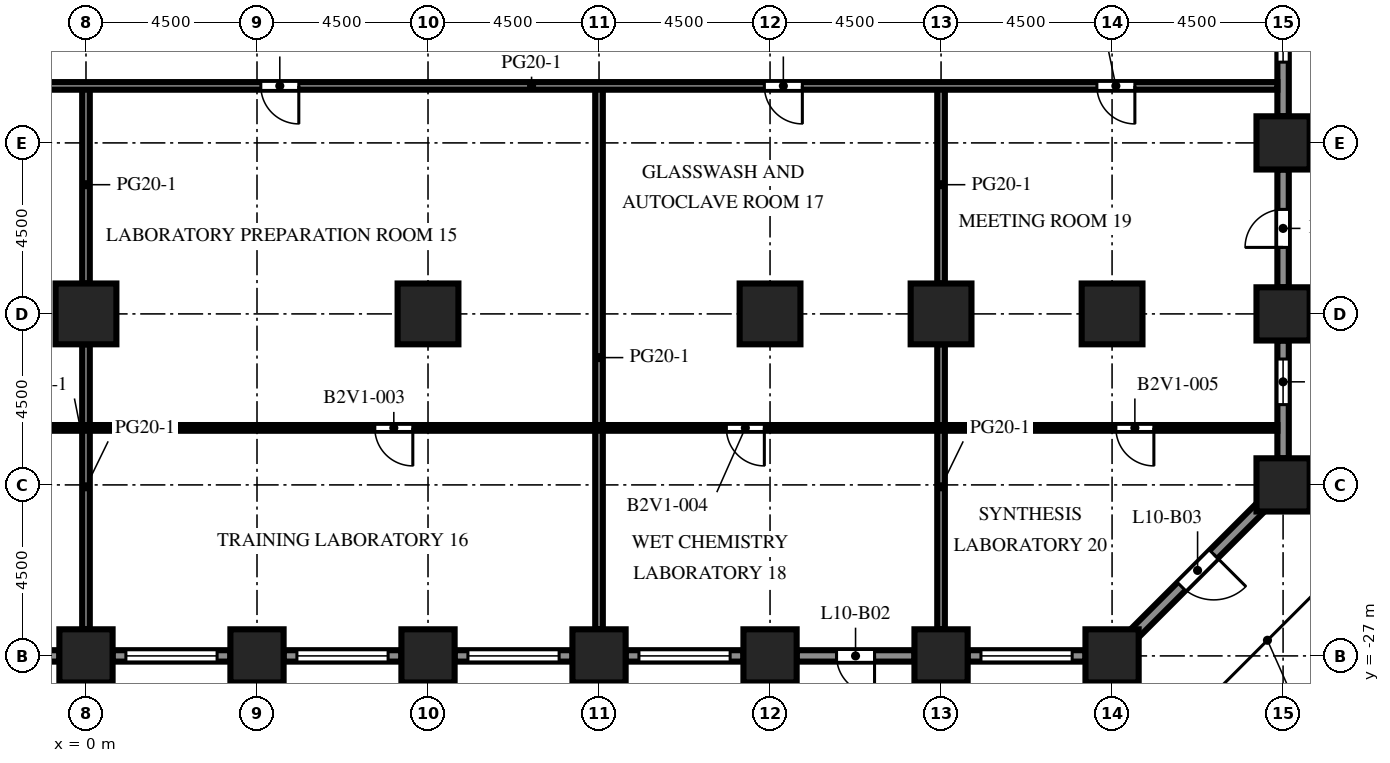
"""IFC4 building model, lengths in metres.
Left out: names, types, materials, properties, quantities, classifications, styles, units other than length and angle.
Written with IfcOpenShell. Run it as: python <this file> out.ifc"""

import sys

from ifc_helpers import new_model, si_unit, direction, frame, frame_2d, origin, origin_2d, place, context, subcontext, project, spatial, rectangle, extrude, element, fill, save


model = new_model("IFC4")
c1 = context("Model", 3, precision=1e-05, world=origin(), true_north=direction((0.0, 1.0)))
c2 = subcontext(c1, "Body", "Model", "MODEL_VIEW")
j1 = project(units=[si_unit("LENGTHUNIT", "METRE"), si_unit("PLANEANGLEUNIT", "RADIAN")], contexts=[c1])
p1 = place(None, origin())
s1 = spatial("IfcSite", under=j1, at=p1, CompositionType="ELEMENT")
p2 = place(p1, origin())
s2 = spatial("IfcBuilding", under=s1, at=p2, CompositionType="ELEMENT")
p3 = place(p2, frame((0.0, 0.0, 46.0)))
s3 = spatial("IfcBuildingStorey", under=s2, at=p3, CompositionType="ELEMENT", Elevation=46.0)
for number, where, z_axis, x_axis in (
    (1, (0.0, -27.0, 0.0), (0.0, 0.0, 1.0), (1.0, 0.0, 0.0)),
    (2, (4.5, -27.0, 0.0), (0.0, 0.0, 1.0), (1.0, 0.0, 0.0)),
    (3, (9.0, -27.0, 0.0), (0.0, 0.0, 1.0), (1.0, 0.0, 0.0)),
    (4, (13.5, -27.0, 0.0), (0.0, 0.0, 1.0), (1.0, 0.0, 0.0)),
    (5, (18.0, -27.0, 0.0), (0.0, 0.0, 1.0), (1.0, 0.0, 0.0)),
    (6, (22.5, -27.0, 0.0), (0.0, 0.0, 1.0), (1.0, 0.0, 0.0)),
    (7, (27.0, -27.0, 0.0), (0.0, 0.0, 1.0), (1.0, 0.0, 0.0)),
    (8, (31.5, -22.5, 0.0), (0.0, 0.0, 1.0), (1.0, 0.0, 0.0)),
    (9, (31.5, -18.0, 0.0), (0.0, 0.0, 1.0), (1.0, 0.0, 0.0)),
    (10, (31.5, -13.5, 0.0), (0.0, 0.0, 1.0), (1.0, 0.0, 0.0)),
):
    element("IfcColumn", number, at=place(p3, frame(where, z_axis=z_axis, x_axis=x_axis)), inside=s3, PredefinedType="COLUMN", context=c2, shape_type="SweptSolid", body=[
        extrude(rectangle(XDim=1.4, YDim=1.4, at=origin_2d()), origin(), (0.0, 0.0, 1.0), 4.1),
    ])
for number, where, z_axis, x_axis in (
    (11, (0.0, -18.0, 0.0), (0.0, 0.0, 1.0), (1.0, 0.0, 0.0)),
    (12, (9.0, -18.0, 0.0), (0.0, 0.0, 1.0), (1.0, 0.0, 0.0)),
    (13, (18.0, -18.0, 0.0), (0.0, 0.0, 1.0), (1.0, 0.0, 0.0)),
    (14, (22.5, -18.0, 0.0), (0.0, 0.0, 1.0), (1.0, 0.0, 0.0)),
    (15, (27.0, -18.0, 0.0), (0.0, 0.0, 1.0), (1.0, 0.0, 0.0)),
):
    element("IfcColumn", number, at=place(p3, frame(where, z_axis=z_axis, x_axis=x_axis)), inside=s3, PredefinedType="COLUMN", context=c2, shape_type="SweptSolid", body=[
        extrude(rectangle(XDim=1.6, YDim=1.6, at=origin_2d()), origin(), (0.0, 0.0, 1.0), 4.1),
    ])
p4 = place(p3, frame((-0.7, -27.0, 0.0), z_axis=(0.0, 0.0, 1.0), x_axis=(-1.0, 0.0, 0.0)))
e16 = element("IfcWall", 16, at=p4, inside=s3, PredefinedType="SOLIDWALL", context=c2, shape_type="SweptSolid", body=[
    extrude(rectangle(XDim=3.1, YDim=0.3, at=frame_2d((1.55, 0.0))), origin(), (0.0, 0.0, 1.0), 2.75),
])
p5 = place(p4, frame((0.35, 0.0, 0.8)))
e17 = element("IfcOpeningElement", 17, at=p5, cuts=e16, PredefinedType="OPENING", context=c2, shape_type="SweptSolid", body=[
    extrude(rectangle(XDim=2.4, YDim=1.7, at=frame_2d((1.2, 0.85))), frame((0.0, 0.16, 0.0), z_axis=(0.0, -1.0, 0.0), x_axis=(1.0, 0.0, 0.0)), (0.0, 0.0, 1.0), 0.32),
])
p6 = place(p3, frame((3.8, -27.0, 0.0), z_axis=(0.0, 0.0, 1.0), x_axis=(-1.0, 0.0, 0.0)))
e18 = element("IfcWall", 18, at=p6, inside=s3, PredefinedType="SOLIDWALL", context=c2, shape_type="SweptSolid", body=[
    extrude(rectangle(XDim=3.1, YDim=0.3, at=frame_2d((1.55, 0.0))), origin(), (0.0, 0.0, 1.0), 2.75),
])
p7 = place(p6, frame((0.35, 0.0, 0.8)))
e19 = element("IfcOpeningElement", 19, at=p7, cuts=e18, PredefinedType="OPENING", context=c2, shape_type="SweptSolid", body=[
    extrude(rectangle(XDim=2.4, YDim=1.7, at=frame_2d((1.2, 0.85))), frame((0.0, 0.16, 0.0), z_axis=(0.0, -1.0, 0.0), x_axis=(1.0, 0.0, 0.0)), (0.0, 0.0, 1.0), 0.32),
])
p8 = place(p3, frame((8.3, -27.0, 0.0), z_axis=(0.0, 0.0, 1.0), x_axis=(-1.0, 0.0, 0.0)))
e20 = element("IfcWall", 20, at=p8, inside=s3, PredefinedType="SOLIDWALL", context=c2, shape_type="SweptSolid", body=[
    extrude(rectangle(XDim=3.1, YDim=0.3, at=frame_2d((1.55, 0.0))), origin(), (0.0, 0.0, 1.0), 2.75),
])
p9 = place(p8, frame((0.35, 0.0, 0.8)))
e21 = element("IfcOpeningElement", 21, at=p9, cuts=e20, PredefinedType="OPENING", context=c2, shape_type="SweptSolid", body=[
    extrude(rectangle(XDim=2.4, YDim=1.7, at=frame_2d((1.2, 0.85))), frame((0.0, 0.16, 0.0), z_axis=(0.0, -1.0, 0.0), x_axis=(1.0, 0.0, 0.0)), (0.0, 0.0, 1.0), 0.32),
])
p10 = place(p3, frame((12.8, -27.0, 0.0), z_axis=(0.0, 0.0, 1.0), x_axis=(-1.0, 0.0, 0.0)))
e22 = element("IfcWall", 22, at=p10, inside=s3, PredefinedType="SOLIDWALL", context=c2, shape_type="SweptSolid", body=[
    extrude(rectangle(XDim=3.1, YDim=0.3, at=frame_2d((1.55, 0.0))), origin(), (0.0, 0.0, 1.0), 2.75),
])
p11 = place(p10, frame((0.35, 0.0, 0.8)))
e23 = element("IfcOpeningElement", 23, at=p11, cuts=e22, PredefinedType="OPENING", context=c2, shape_type="SweptSolid", body=[
    extrude(rectangle(XDim=2.4, YDim=1.7, at=frame_2d((1.2, 0.85))), frame((0.0, 0.16, 0.0), z_axis=(0.0, -1.0, 0.0), x_axis=(1.0, 0.0, 0.0)), (0.0, 0.0, 1.0), 0.32),
])
p12 = place(p3, frame((17.3, -27.0, 0.0), z_axis=(0.0, 0.0, 1.0), x_axis=(-1.0, 0.0, 0.0)))
e24 = element("IfcWall", 24, at=p12, inside=s3, PredefinedType="SOLIDWALL", context=c2, shape_type="SweptSolid", body=[
    extrude(rectangle(XDim=3.1, YDim=0.3, at=frame_2d((1.55, 0.0))), origin(), (0.0, 0.0, 1.0), 2.75),
])
p13 = place(p12, frame((0.35, 0.0, 0.8)))
e25 = element("IfcOpeningElement", 25, at=p13, cuts=e24, PredefinedType="OPENING", context=c2, shape_type="SweptSolid", body=[
    extrude(rectangle(XDim=2.4, YDim=1.7, at=frame_2d((1.2, 0.85))), frame((0.0, 0.16, 0.0), z_axis=(0.0, -1.0, 0.0), x_axis=(1.0, 0.0, 0.0)), (0.0, 0.0, 1.0), 0.32),
])
p14 = place(p3, frame((21.8, -27.0, 0.0), z_axis=(0.0, 0.0, 1.0), x_axis=(-1.0, 0.0, 0.0)))
e26 = element("IfcWall", 26, at=p14, inside=s3, PredefinedType="SOLIDWALL", context=c2, shape_type="SweptSolid", body=[
    extrude(rectangle(XDim=3.1, YDim=0.3, at=frame_2d((1.55, 0.0))), origin(), (0.0, 0.0, 1.0), 2.75),
])
p15 = place(p14, frame((1.05, 0.0, 0.0)))
e27 = element("IfcOpeningElement", 27, at=p15, cuts=e26, PredefinedType="OPENING", context=c2, shape_type="SweptSolid", body=[
    extrude(rectangle(XDim=1.0, YDim=2.2, at=frame_2d((0.5, 1.1))), frame((0.0, 0.16, 0.0), z_axis=(0.0, -1.0, 0.0), x_axis=(1.0, 0.0, 0.0)), (0.0, 0.0, 1.0), 0.32),
])
p16 = place(p3, frame((26.3, -27.0, 0.0), z_axis=(0.0, 0.0, 1.0), x_axis=(-1.0, 0.0, 0.0)))
e28 = element("IfcWall", 28, at=p16, inside=s3, PredefinedType="SOLIDWALL", context=c2, shape_type="SweptSolid", body=[
    extrude(rectangle(XDim=3.1, YDim=0.3, at=frame_2d((1.55, 0.0))), origin(), (0.0, 0.0, 1.0), 2.75),
])
p17 = place(p16, frame((0.35, 0.0, 0.8)))
e29 = element("IfcOpeningElement", 29, at=p17, cuts=e28, PredefinedType="OPENING", context=c2, shape_type="SweptSolid", body=[
    extrude(rectangle(XDim=2.4, YDim=1.7, at=frame_2d((1.2, 0.85))), frame((0.0, 0.16, 0.0), z_axis=(0.0, -1.0, 0.0), x_axis=(1.0, 0.0, 0.0)), (0.0, 0.0, 1.0), 0.32),
])
p18 = place(p3, frame((30.906, -23.094, 0.0), z_axis=(0.0, 0.0, 1.0), x_axis=(-0.707106781187, -0.707106781187, 0.0)))
e30 = element("IfcWall", 30, at=p18, inside=s3, PredefinedType="SOLIDWALL", context=c2, shape_type="SweptSolid", body=[
    extrude(rectangle(XDim=4.684, YDim=0.3, at=frame_2d((2.342, 0.0))), origin(), (0.0, 0.0, 1.0), 2.75),
])
p19 = place(p18, frame((1.742, 0.0, 0.0)))
e31 = element("IfcOpeningElement", 31, at=p19, cuts=e30, PredefinedType="OPENING", context=c2, shape_type="SweptSolid", body=[
    extrude(rectangle(XDim=1.2, YDim=2.2, at=frame_2d((0.6, 1.1))), frame((0.0, 0.16, 0.0), z_axis=(0.0, -1.0, 0.0), x_axis=(1.0, 0.0, 0.0)), (0.0, 0.0, 1.0), 0.32),
])
p20 = place(p3, frame((31.5, -18.7, 0.0), z_axis=(0.0, 0.0, 1.0), x_axis=(0.0, -1.0, 0.0)))
e32 = element("IfcWall", 32, at=p20, inside=s3, PredefinedType="SOLIDWALL", context=c2, shape_type="SweptSolid", body=[
    extrude(rectangle(XDim=3.1, YDim=0.3, at=frame_2d((1.55, 0.0))), origin(), (0.0, 0.0, 1.0), 2.75),
])
p21 = place(p20, frame((0.488, 0.0, 0.8)))
e33 = element("IfcOpeningElement", 33, at=p21, cuts=e32, PredefinedType="OPENING", context=c2, shape_type="SweptSolid", body=[
    extrude(rectangle(XDim=1.2, YDim=1.7, at=frame_2d((0.6, 0.85))), frame((0.0, 0.16, 0.0), z_axis=(0.0, -1.0, 0.0), x_axis=(1.0, 0.0, 0.0)), (0.0, 0.0, 1.0), 0.32),
])
p22 = place(p3, frame((31.5, -14.2, 0.0), z_axis=(0.0, 0.0, 1.0), x_axis=(0.0, -1.0, 0.0)))
e34 = element("IfcWall", 34, at=p22, inside=s3, PredefinedType="SOLIDWALL", context=c2, shape_type="SweptSolid", body=[
    extrude(rectangle(XDim=3.1, YDim=0.3, at=frame_2d((1.55, 0.0))), origin(), (0.0, 0.0, 1.0), 2.75),
])
p23 = place(p22, frame((1.05, 0.0, 0.0)))
e35 = element("IfcOpeningElement", 35, at=p23, cuts=e34, PredefinedType="OPENING", context=c2, shape_type="SweptSolid", body=[
    extrude(rectangle(XDim=1.0, YDim=2.2, at=frame_2d((0.5, 1.1))), frame((0.0, 0.16, 0.0), z_axis=(0.0, -1.0, 0.0), x_axis=(1.0, 0.0, 0.0)), (0.0, 0.0, 1.0), 0.32),
])
p24 = place(p3, frame((31.5, -9.7, 0.0), z_axis=(0.0, 0.0, 1.0), x_axis=(0.0, -1.0, 0.0)))
e36 = element("IfcWall", 36, at=p24, inside=s3, PredefinedType="SOLIDWALL", context=c2, shape_type="SweptSolid", body=[
    extrude(rectangle(XDim=3.1, YDim=0.3, at=frame_2d((1.55, 0.0))), origin(), (0.0, 0.0, 1.0), 2.75),
])
p25 = place(p24, frame((0.475, 0.0, 0.8)))
e37 = element("IfcOpeningElement", 37, at=p25, cuts=e36, PredefinedType="OPENING", context=c2, shape_type="SweptSolid", body=[
    extrude(rectangle(XDim=1.2, YDim=1.7, at=frame_2d((0.6, 0.85))), frame((0.0, 0.16, 0.0), z_axis=(0.0, -1.0, 0.0), x_axis=(1.0, 0.0, 0.0)), (0.0, 0.0, 1.0), 0.32),
])
p26 = place(p3, frame((0.0, -26.3, 0.0), z_axis=(0.0, 0.0, 1.0), x_axis=(0.0, 1.0, 0.0)))
e38 = element("IfcWall", 38, at=p26, inside=s3, PredefinedType="PARTITIONING", context=c2, shape_type="SweptSolid", body=[
    extrude(rectangle(XDim=7.5, YDim=0.2, at=frame_2d((3.75, 0.0))), origin(), (0.0, 0.0, 1.0), 3.65),
])
p27 = place(p3, frame((0.0, -17.2, 0.0), z_axis=(0.0, 0.0, 1.0), x_axis=(0.0, 1.0, 0.0)))
e39 = element("IfcWall", 39, at=p27, inside=s3, PredefinedType="PARTITIONING", context=c2, shape_type="SweptSolid", body=[
    extrude(rectangle(XDim=5.2, YDim=0.2, at=frame_2d((2.6, 0.0))), origin(), (0.0, 0.0, 1.0), 3.65),
])
p28 = place(p3, frame((13.5, -26.3, 0.0), z_axis=(0.0, 0.0, 1.0), x_axis=(0.0, 1.0, 0.0)))
e40 = element("IfcWall", 40, at=p28, inside=s3, PredefinedType="PARTITIONING", context=c2, shape_type="SweptSolid", body=[
    extrude(rectangle(XDim=14.3, YDim=0.2, at=frame_2d((7.15, 0.0))), origin(), (0.0, 0.0, 1.0), 3.65),
])
p29 = place(p3, frame((22.5, -26.3, 0.0), z_axis=(0.0, 0.0, 1.0), x_axis=(0.0, 1.0, 0.0)))
e41 = element("IfcWall", 41, at=p29, inside=s3, PredefinedType="PARTITIONING", context=c2, shape_type="SweptSolid", body=[
    extrude(rectangle(XDim=7.5, YDim=0.2, at=frame_2d((3.75, 0.0))), origin(), (0.0, 0.0, 1.0), 3.65),
])
p30 = place(p3, frame((22.5, -17.2, 0.0), z_axis=(0.0, 0.0, 1.0), x_axis=(0.0, 1.0, 0.0)))
e42 = element("IfcWall", 42, at=p30, inside=s3, PredefinedType="PARTITIONING", context=c2, shape_type="SweptSolid", body=[
    extrude(rectangle(XDim=5.2, YDim=0.2, at=frame_2d((2.6, 0.0))), origin(), (0.0, 0.0, 1.0), 3.65),
])
p31 = place(p3, frame((31.35, -21.0, 0.0), z_axis=(0.0, 0.0, 1.0), x_axis=(-1.0, 0.0, 0.0)))
e43 = element("IfcWall", 43, at=p31, inside=s3, PredefinedType="PARTITIONING", context=c2, shape_type="SweptSolid", body=[
    extrude(rectangle(XDim=53.7, YDim=0.15, at=frame_2d((26.85, 0.0))), origin(), (0.0, 0.0, 1.0), 3.65),
])
p32 = place(p31, frame((48.5, 0.0, 0.0)))
e44 = element("IfcOpeningElement", 44, at=p32, cuts=e43, PredefinedType="OPENING", context=c2, shape_type="SweptSolid", body=[
    extrude(rectangle(XDim=1.0, YDim=2.1, at=frame_2d((0.5, 1.05))), frame((0.0, 0.085, 0.0), z_axis=(0.0, -1.0, 0.0), x_axis=(1.0, 0.0, 0.0)), (0.0, 0.0, 1.0), 0.17),
])
p33 = place(p31, frame((39.25, 0.0, 0.0)))
e45 = element("IfcOpeningElement", 45, at=p33, cuts=e43, PredefinedType="OPENING", context=c2, shape_type="SweptSolid", body=[
    extrude(rectangle(XDim=1.0, YDim=2.1, at=frame_2d((0.5, 1.05))), frame((0.0, 0.085, 0.0), z_axis=(0.0, -1.0, 0.0), x_axis=(1.0, 0.0, 0.0)), (0.0, 0.0, 1.0), 0.17),
])
p34 = place(p31, frame((22.75, 0.0, 0.0)))
e46 = element("IfcOpeningElement", 46, at=p34, cuts=e43, PredefinedType="OPENING", context=c2, shape_type="SweptSolid", body=[
    extrude(rectangle(XDim=1.0, YDim=2.1, at=frame_2d((0.5, 1.05))), frame((0.0, 0.085, 0.0), z_axis=(0.0, -1.0, 0.0), x_axis=(1.0, 0.0, 0.0)), (0.0, 0.0, 1.0), 0.17),
])
p35 = place(p31, frame((13.5, 0.0, 0.0)))
e47 = element("IfcOpeningElement", 47, at=p35, cuts=e43, PredefinedType="OPENING", context=c2, shape_type="SweptSolid", body=[
    extrude(rectangle(XDim=1.0, YDim=2.1, at=frame_2d((0.5, 1.05))), frame((0.0, 0.085, 0.0), z_axis=(0.0, -1.0, 0.0), x_axis=(1.0, 0.0, 0.0)), (0.0, 0.0, 1.0), 0.17),
])
p36 = place(p31, frame((3.25, 0.0, 0.0)))
e48 = element("IfcOpeningElement", 48, at=p36, cuts=e43, PredefinedType="OPENING", context=c2, shape_type="SweptSolid", body=[
    extrude(rectangle(XDim=1.0, YDim=2.1, at=frame_2d((0.5, 1.05))), frame((0.0, 0.085, 0.0), z_axis=(0.0, -1.0, 0.0), x_axis=(1.0, 0.0, 0.0)), (0.0, 0.0, 1.0), 0.17),
])
p37 = place(p3, frame((31.35, -12.0, 0.0), z_axis=(0.0, 0.0, 1.0), x_axis=(-1.0, 0.0, 0.0)))
e49 = element("IfcWall", 49, at=p37, inside=s3, PredefinedType="PARTITIONING", context=c2, shape_type="SweptSolid", body=[
    extrude(rectangle(XDim=53.7, YDim=0.2, at=frame_2d((26.85, 0.0))), origin(), (0.0, 0.0, 1.0), 3.65),
])
p38 = place(p37, frame((48.25, 0.0, 0.0)))
e50 = element("IfcOpeningElement", 50, at=p38, cuts=e49, PredefinedType="OPENING", context=c2, shape_type="SweptSolid", body=[
    extrude(rectangle(XDim=1.0, YDim=2.1, at=frame_2d((0.5, 1.05))), frame((0.0, 0.11, 0.0), z_axis=(0.0, -1.0, 0.0), x_axis=(1.0, 0.0, 0.0)), (0.0, 0.0, 1.0), 0.22),
])
p39 = place(p37, frame((36.0, 0.0, 0.0)))
e51 = element("IfcOpeningElement", 51, at=p39, cuts=e49, PredefinedType="OPENING", context=c2, shape_type="SweptSolid", body=[
    extrude(rectangle(XDim=1.0, YDim=2.1, at=frame_2d((0.5, 1.05))), frame((0.0, 0.11, 0.0), z_axis=(0.0, -1.0, 0.0), x_axis=(1.0, 0.0, 0.0)), (0.0, 0.0, 1.0), 0.22),
])
p40 = place(p37, frame((25.75, 0.0, 0.0)))
e52 = element("IfcOpeningElement", 52, at=p40, cuts=e49, PredefinedType="OPENING", context=c2, shape_type="SweptSolid", body=[
    extrude(rectangle(XDim=1.0, YDim=2.1, at=frame_2d((0.5, 1.05))), frame((0.0, 0.11, 0.0), z_axis=(0.0, -1.0, 0.0), x_axis=(1.0, 0.0, 0.0)), (0.0, 0.0, 1.0), 0.22),
])
p41 = place(p37, frame((12.5, 0.0, 0.0)))
e53 = element("IfcOpeningElement", 53, at=p41, cuts=e49, PredefinedType="OPENING", context=c2, shape_type="SweptSolid", body=[
    extrude(rectangle(XDim=1.0, YDim=2.1, at=frame_2d((0.5, 1.05))), frame((0.0, 0.11, 0.0), z_axis=(0.0, -1.0, 0.0), x_axis=(1.0, 0.0, 0.0)), (0.0, 0.0, 1.0), 0.22),
])
p42 = place(p37, frame((3.75, 0.0, 0.0)))
e54 = element("IfcOpeningElement", 54, at=p42, cuts=e49, PredefinedType="OPENING", context=c2, shape_type="SweptSolid", body=[
    extrude(rectangle(XDim=1.0, YDim=2.1, at=frame_2d((0.5, 1.05))), frame((0.0, 0.11, 0.0), z_axis=(0.0, -1.0, 0.0), x_axis=(1.0, 0.0, 0.0)), (0.0, 0.0, 1.0), 0.22),
])
p43 = place(p7, origin())
e55 = element("IfcWindow", 55, at=p43, inside=s3, PartitioningType="SINGLE_PANEL", PredefinedType="WINDOW", context=c2, shape_type="SweptSolid", body=[
    extrude(rectangle(XDim=2.4, YDim=1.7, at=frame_2d((1.2, 0.85))), frame((0.0, 0.03, 0.0), z_axis=(0.0, -1.0, 0.0), x_axis=(1.0, 0.0, 0.0)), (0.0, 0.0, 1.0), 0.06),
])
fill(e19, e55)
p44 = place(p9, origin())
e56 = element("IfcWindow", 56, at=p44, inside=s3, PartitioningType="SINGLE_PANEL", PredefinedType="WINDOW", context=c2, shape_type="SweptSolid", body=[
    extrude(rectangle(XDim=2.4, YDim=1.7, at=frame_2d((1.2, 0.85))), frame((0.0, 0.03, 0.0), z_axis=(0.0, -1.0, 0.0), x_axis=(1.0, 0.0, 0.0)), (0.0, 0.0, 1.0), 0.06),
])
fill(e21, e56)
p45 = place(p11, origin())
e57 = element("IfcWindow", 57, at=p45, inside=s3, PartitioningType="SINGLE_PANEL", PredefinedType="WINDOW", context=c2, shape_type="SweptSolid", body=[
    extrude(rectangle(XDim=2.4, YDim=1.7, at=frame_2d((1.2, 0.85))), frame((0.0, 0.03, 0.0), z_axis=(0.0, -1.0, 0.0), x_axis=(1.0, 0.0, 0.0)), (0.0, 0.0, 1.0), 0.06),
])
fill(e23, e57)
p46 = place(p13, origin())
e58 = element("IfcWindow", 58, at=p46, inside=s3, PartitioningType="SINGLE_PANEL", PredefinedType="WINDOW", context=c2, shape_type="SweptSolid", body=[
    extrude(rectangle(XDim=2.4, YDim=1.7, at=frame_2d((1.2, 0.85))), frame((0.0, 0.03, 0.0), z_axis=(0.0, -1.0, 0.0), x_axis=(1.0, 0.0, 0.0)), (0.0, 0.0, 1.0), 0.06),
])
fill(e25, e58)
p47 = place(p15, origin())
e59 = element("IfcDoor", 59, at=p47, inside=s3, OperationType="SINGLE_SWING_LEFT", PredefinedType="DOOR", context=c2, shape_type="SweptSolid", body=[
    extrude(rectangle(XDim=1.0, YDim=2.2, at=frame_2d((0.5, 1.1))), frame((0.0, 0.025, 0.0), z_axis=(0.0, -1.0, 0.0), x_axis=(1.0, 0.0, 0.0)), (0.0, 0.0, 1.0), 0.05),
])
fill(e27, e59)
p48 = place(p17, origin())
e60 = element("IfcWindow", 60, at=p48, inside=s3, PartitioningType="SINGLE_PANEL", PredefinedType="WINDOW", context=c2, shape_type="SweptSolid", body=[
    extrude(rectangle(XDim=2.4, YDim=1.7, at=frame_2d((1.2, 0.85))), frame((0.0, 0.03, 0.0), z_axis=(0.0, -1.0, 0.0), x_axis=(1.0, 0.0, 0.0)), (0.0, 0.0, 1.0), 0.06),
])
fill(e29, e60)
p49 = place(p19, origin())
e61 = element("IfcDoor", 61, at=p49, inside=s3, OperationType="SINGLE_SWING_LEFT", PredefinedType="DOOR", context=c2, shape_type="SweptSolid", body=[
    extrude(rectangle(XDim=1.2, YDim=2.2, at=frame_2d((0.6, 1.1))), frame((0.0, 0.025, 0.0), z_axis=(0.0, -1.0, 0.0), x_axis=(1.0, 0.0, 0.0)), (0.0, 0.0, 1.0), 0.05),
])
fill(e31, e61)
p50 = place(p21, origin())
e62 = element("IfcWindow", 62, at=p50, inside=s3, PartitioningType="SINGLE_PANEL", PredefinedType="WINDOW", context=c2, shape_type="SweptSolid", body=[
    extrude(rectangle(XDim=1.2, YDim=1.7, at=frame_2d((0.6, 0.85))), frame((0.0, 0.03, 0.0), z_axis=(0.0, -1.0, 0.0), x_axis=(1.0, 0.0, 0.0)), (0.0, 0.0, 1.0), 0.06),
])
fill(e33, e62)
p51 = place(p23, origin())
e63 = element("IfcDoor", 63, at=p51, inside=s3, OperationType="SINGLE_SWING_RIGHT", PredefinedType="DOOR", context=c2, shape_type="SweptSolid", body=[
    extrude(rectangle(XDim=1.0, YDim=2.2, at=frame_2d((0.5, 1.1))), frame((0.0, 0.025, 0.0), z_axis=(0.0, -1.0, 0.0), x_axis=(1.0, 0.0, 0.0)), (0.0, 0.0, 1.0), 0.05),
])
fill(e35, e63)
p52 = place(p25, origin())
e64 = element("IfcWindow", 64, at=p52, inside=s3, PartitioningType="SINGLE_PANEL", PredefinedType="WINDOW", context=c2, shape_type="SweptSolid", body=[
    extrude(rectangle(XDim=1.2, YDim=1.7, at=frame_2d((0.6, 0.85))), frame((0.0, 0.03, 0.0), z_axis=(0.0, -1.0, 0.0), x_axis=(1.0, 0.0, 0.0)), (0.0, 0.0, 1.0), 0.06),
])
fill(e37, e64)
p53 = place(p34, origin())
e65 = element("IfcDoor", 65, at=p53, inside=s3, OperationType="SINGLE_SWING_LEFT", PredefinedType="DOOR", context=c2, shape_type="SweptSolid", body=[
    extrude(rectangle(XDim=1.0, YDim=2.1, at=frame_2d((0.5, 1.05))), frame((0.0, 0.025, 0.0), z_axis=(0.0, -1.0, 0.0), x_axis=(1.0, 0.0, 0.0)), (0.0, 0.0, 1.0), 0.05),
])
fill(e46, e65)
p54 = place(p35, origin())
e66 = element("IfcDoor", 66, at=p54, inside=s3, OperationType="SINGLE_SWING_LEFT", PredefinedType="DOOR", context=c2, shape_type="SweptSolid", body=[
    extrude(rectangle(XDim=1.0, YDim=2.1, at=frame_2d((0.5, 1.05))), frame((0.0, 0.025, 0.0), z_axis=(0.0, -1.0, 0.0), x_axis=(1.0, 0.0, 0.0)), (0.0, 0.0, 1.0), 0.05),
])
fill(e47, e66)
p55 = place(p36, origin())
e67 = element("IfcDoor", 67, at=p55, inside=s3, OperationType="SINGLE_SWING_LEFT", PredefinedType="DOOR", context=c2, shape_type="SweptSolid", body=[
    extrude(rectangle(XDim=1.0, YDim=2.1, at=frame_2d((0.5, 1.05))), frame((0.0, 0.025, 0.0), z_axis=(0.0, -1.0, 0.0), x_axis=(1.0, 0.0, 0.0)), (0.0, 0.0, 1.0), 0.05),
])
fill(e48, e67)
p56 = place(p40, origin())
e68 = element("IfcDoor", 68, at=p56, inside=s3, OperationType="SINGLE_SWING_LEFT", PredefinedType="DOOR", context=c2, shape_type="SweptSolid", body=[
    extrude(rectangle(XDim=1.0, YDim=2.1, at=frame_2d((0.5, 1.05))), frame((0.0, 0.025, 0.0), z_axis=(0.0, -1.0, 0.0), x_axis=(1.0, 0.0, 0.0)), (0.0, 0.0, 1.0), 0.05),
])
fill(e52, e68)
p57 = place(p41, origin())
e69 = element("IfcDoor", 69, at=p57, inside=s3, OperationType="SINGLE_SWING_LEFT", PredefinedType="DOOR", context=c2, shape_type="SweptSolid", body=[
    extrude(rectangle(XDim=1.0, YDim=2.1, at=frame_2d((0.5, 1.05))), frame((0.0, 0.025, 0.0), z_axis=(0.0, -1.0, 0.0), x_axis=(1.0, 0.0, 0.0)), (0.0, 0.0, 1.0), 0.05),
])
fill(e53, e69)
p58 = place(p42, origin())
e70 = element("IfcDoor", 70, at=p58, inside=s3, OperationType="SINGLE_SWING_LEFT", PredefinedType="DOOR", context=c2, shape_type="SweptSolid", body=[
    extrude(rectangle(XDim=1.0, YDim=2.1, at=frame_2d((0.5, 1.05))), frame((0.0, 0.025, 0.0), z_axis=(0.0, -1.0, 0.0), x_axis=(1.0, 0.0, 0.0)), (0.0, 0.0, 1.0), 0.05),
])
fill(e54, e70)
save(model, sys.argv[1])
